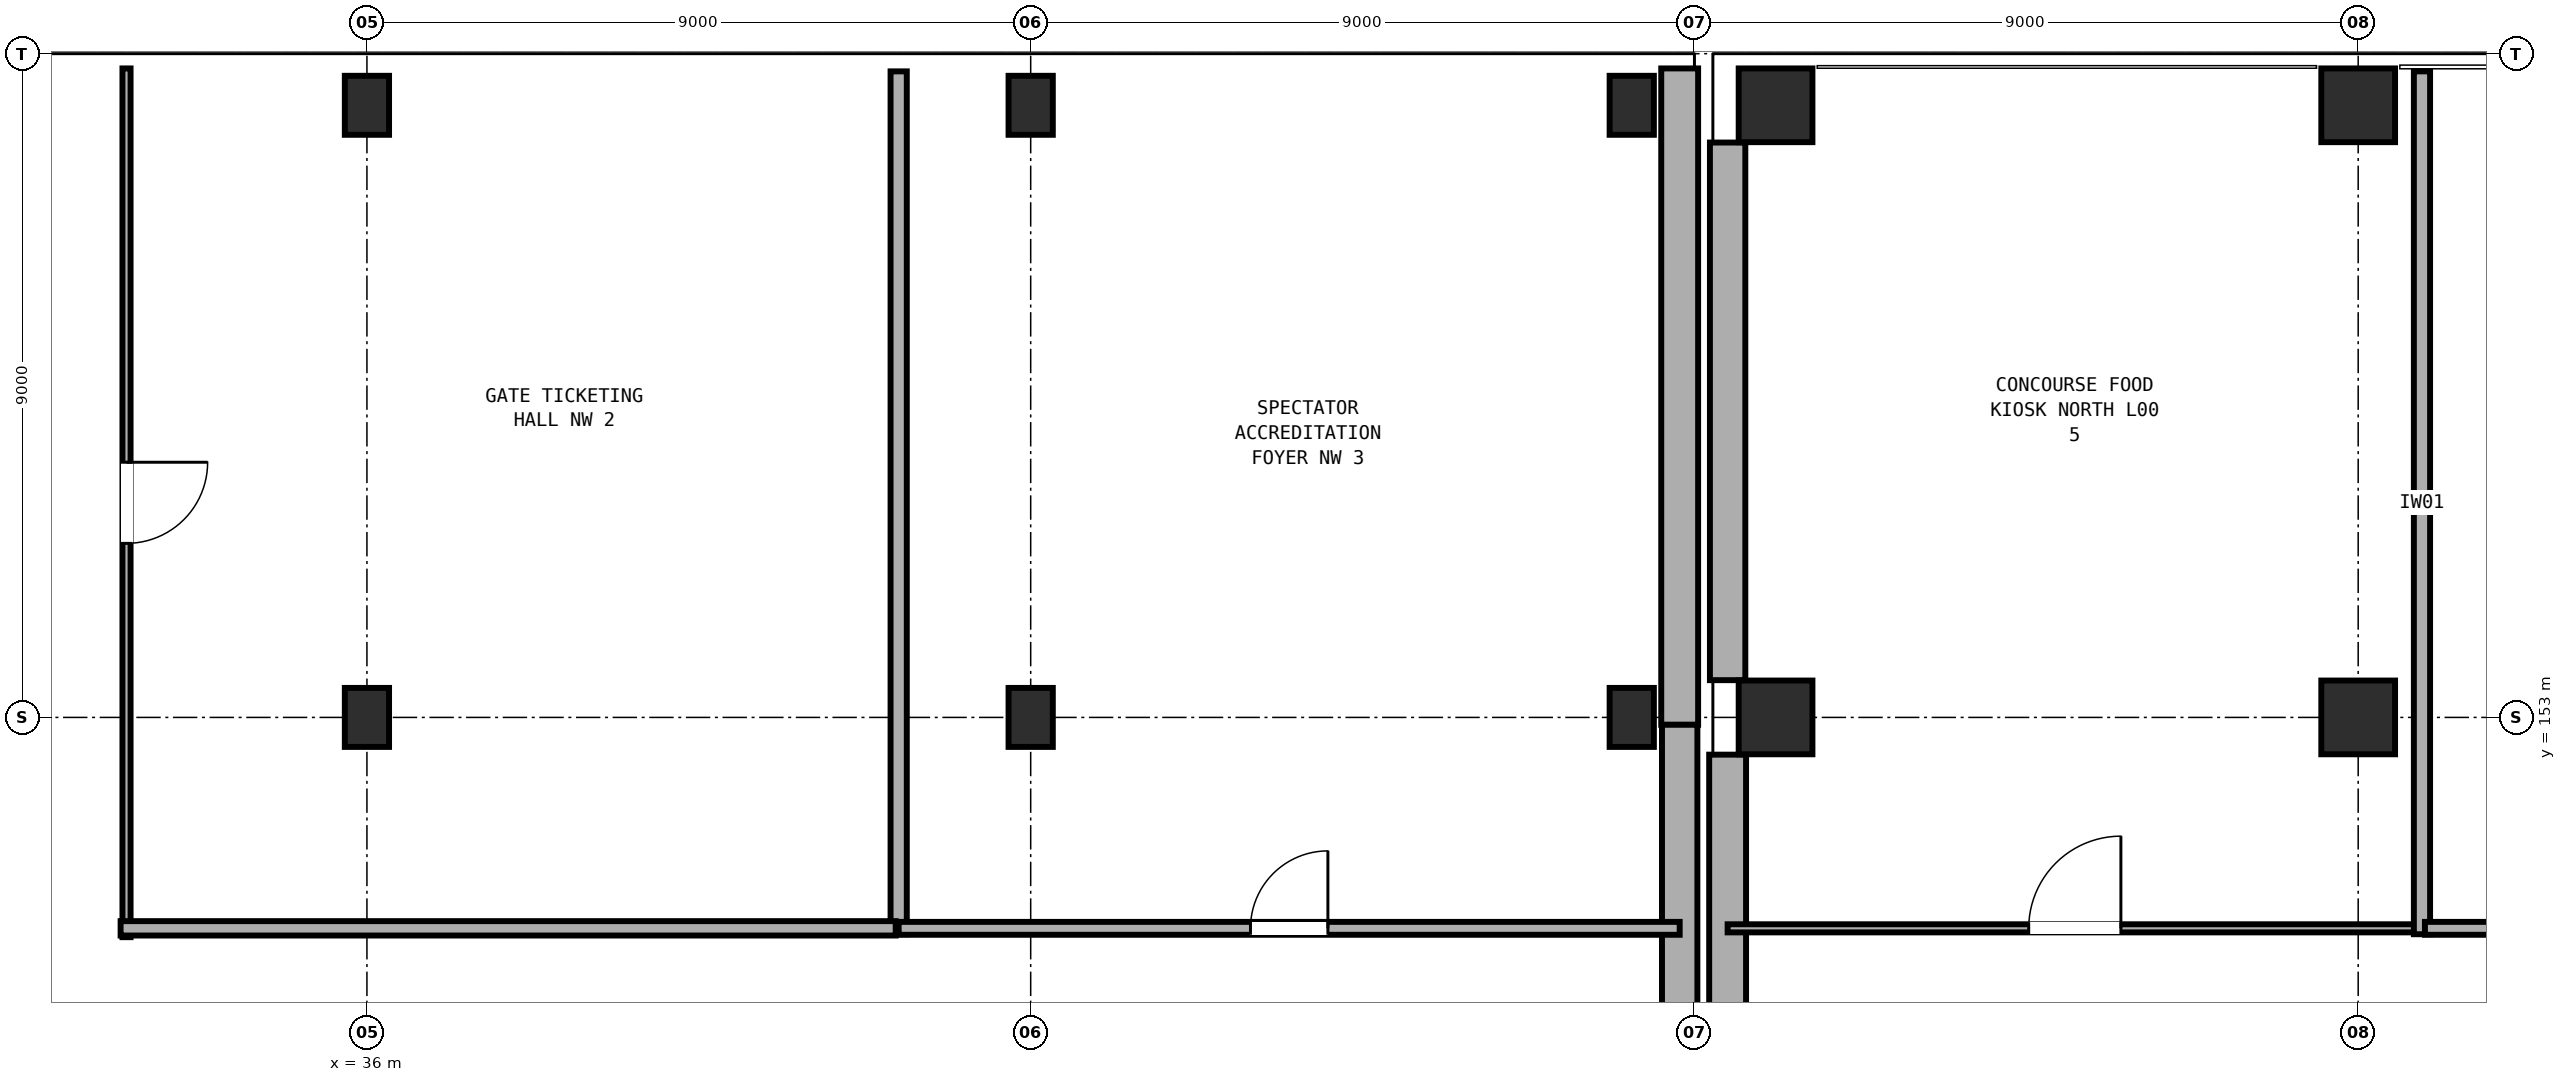
"""IFC4 building model, lengths in metres.
Left out: names, types, materials, properties, quantities, classifications, styles, units other than length and angle.
Written with IfcOpenShell. Run it as: python <this file> out.ifc"""

import sys

from ifc_helpers import new_model, si_unit, direction, frame, frame_2d, origin, origin_2d, place, context, subcontext, project, spatial, rectangle, extrude, element, fill, save


model = new_model("IFC4")
c1 = context("Model", 3, precision=1e-05, world=origin(), true_north=direction((0.0, 1.0)))
c2 = subcontext(c1, "Body", "Model", "MODEL_VIEW")
j1 = project(units=[si_unit("LENGTHUNIT", "METRE"), si_unit("PLANEANGLEUNIT", "RADIAN")], contexts=[c1])
p1 = place(None, origin())
s1 = spatial("IfcSite", under=j1, at=p1, CompositionType="ELEMENT")
p2 = place(p1, origin())
s2 = spatial("IfcBuilding", under=s1, at=p2, CompositionType="ELEMENT")
p3 = place(p2, origin())
s3 = spatial("IfcBuildingStorey", under=s2, at=p3, CompositionType="ELEMENT", Elevation=0.0)
for number, where, z_axis, x_axis in (
    (1, (55.1, 153.0, 0.0), (0.0, 0.0, 1.0), (1.0, 0.0, 0.0)),
    (2, (55.1, 161.3, 0.0), (0.0, 0.0, 1.0), (1.0, 0.0, 0.0)),
    (3, (63.0, 153.0, 0.0), (0.0, 0.0, 1.0), (1.0, 0.0, 0.0)),
    (4, (63.0, 161.3, 0.0), (0.0, 0.0, 1.0), (1.0, 0.0, 0.0)),
):
    element("IfcColumn", number, at=place(p3, frame(where, z_axis=z_axis, x_axis=x_axis)), inside=s3, PredefinedType="COLUMN", context=c2, shape_type="SweptSolid", body=[
        extrude(rectangle(XDim=1.0, YDim=1.0, at=origin_2d()), origin(), (0.0, 0.0, 1.0), 4.8),
    ])
for number, where, z_axis, x_axis in (
    (5, (36.0, 153.0, 0.0), (0.0, 0.0, 1.0), (1.0, 0.0, 0.0)),
    (6, (36.0, 161.3, 0.0), (0.0, 0.0, 1.0), (1.0, 0.0, 0.0)),
    (7, (45.0, 153.0, 0.0), (0.0, 0.0, 1.0), (1.0, 0.0, 0.0)),
    (8, (45.0, 161.3, 0.0), (0.0, 0.0, 1.0), (1.0, 0.0, 0.0)),
    (9, (53.15, 153.0, 0.0), (0.0, 0.0, 1.0), (1.0, 0.0, 0.0)),
    (10, (53.15, 161.3, 0.0), (0.0, 0.0, 1.0), (1.0, 0.0, 0.0)),
):
    element("IfcColumn", number, at=place(p3, frame(where, z_axis=z_axis, x_axis=x_axis)), inside=s3, PredefinedType="COLUMN", context=c2, shape_type="SweptSolid", body=[
        extrude(rectangle(XDim=0.6, YDim=0.8, at=origin_2d()), origin(), (0.0, 0.0, 1.0), 4.8),
    ])
p4 = place(p3, frame((54.45, 144.505, 0.0), z_axis=(0.0, 0.0, 1.0), x_axis=(0.0, 1.0, 0.0)))
e11 = element("IfcWall", 11, at=p4, inside=s3, PredefinedType="SOLIDWALL", context=c2, shape_type="SweptSolid", body=[
    extrude(rectangle(XDim=7.99, YDim=0.5, at=frame_2d((3.995, 0.0))), origin(), (0.0, 0.0, 1.0), 3.28),
])
p5 = place(p3, frame((54.45, 153.505, 0.0), z_axis=(0.0, 0.0, 1.0), x_axis=(0.0, 1.0, 0.0)))
e12 = element("IfcWall", 12, at=p5, inside=s3, PredefinedType="SOLIDWALL", context=c2, shape_type="SweptSolid", body=[
    extrude(rectangle(XDim=7.29, YDim=0.48, at=frame_2d((3.645, 0.0))), origin(), (0.0, 0.0, 1.0), 3.28),
])
p6 = place(p3, frame((55.605, 161.8, 0.0), z_axis=(0.0, 0.0, 1.0), x_axis=(1.0, 0.0, 0.0)))
e13 = element("IfcWall", 13, at=p6, inside=s3, PredefinedType="SOLIDWALL", context=c2, shape_type="SweptSolid", body=[
    extrude(rectangle(XDim=6.89, YDim=0.31, at=frame_2d((3.445, 0.0))), origin(), (0.0, 0.0, 1.0), 3.58),
])
p7 = place(p6, frame((1.695, 0.0, 0.0)))
e14 = element("IfcOpeningElement", 14, at=p7, cuts=e13, PredefinedType="OPENING", context=c2, shape_type="SweptSolid", body=[
    extrude(rectangle(XDim=3.5, YDim=2.6, at=frame_2d((1.75, 1.3))), frame((0.0, 0.165, 0.0), z_axis=(0.0, -1.0, 0.0), x_axis=(1.0, 0.0, 0.0)), (0.0, 0.0, 1.0), 0.33),
])
p8 = place(p3, frame((63.505, 161.8, 0.0), z_axis=(0.0, 0.0, 1.0), x_axis=(1.0, 0.0, 0.0)))
e15 = element("IfcWall", 15, at=p8, inside=s3, PredefinedType="SOLIDWALL", context=c2, shape_type="SweptSolid", body=[
    extrude(rectangle(XDim=7.99, YDim=0.29, at=frame_2d((3.995, 0.0))), origin(), (0.0, 0.0, 1.0), 3.58),
])
p9 = place(p8, frame((2.295, 0.0, 0.0)))
e16 = element("IfcOpeningElement", 16, at=p9, cuts=e15, PredefinedType="OPENING", context=c2, shape_type="SweptSolid", body=[
    extrude(rectangle(XDim=3.4, YDim=2.55, at=frame_2d((1.7, 1.275))), frame((0.0, 0.155, 0.0), z_axis=(0.0, -1.0, 0.0), x_axis=(1.0, 0.0, 0.0)), (0.0, 0.0, 1.0), 0.31),
])
p10 = place(p3, frame((27.305, 161.8, 0.0), z_axis=(0.0, 0.0, 1.0), x_axis=(1.0, 0.0, 0.0)))
e17 = element("IfcWall", 17, at=p10, inside=s3, PredefinedType="SOLIDWALL", context=c2, shape_type="SweptSolid", body=[
    extrude(rectangle(XDim=8.39, YDim=0.48, at=frame_2d((4.195, 0.0))), origin(), (0.0, 0.0, 1.0), 3.58),
])
p11 = place(p10, frame((1.395, 0.0, 0.0)))
e18 = element("IfcOpeningElement", 18, at=p11, cuts=e17, PredefinedType="OPENING", context=c2, shape_type="SweptSolid", body=[
    extrude(rectangle(XDim=3.6, YDim=2.6, at=frame_2d((1.8, 1.3))), frame((0.0, 0.25, 0.0), z_axis=(0.0, -1.0, 0.0), x_axis=(1.0, 0.0, 0.0)), (0.0, 0.0, 1.0), 0.5),
])
p12 = place(p3, frame((36.305, 161.8, 0.0), z_axis=(0.0, 0.0, 1.0), x_axis=(1.0, 0.0, 0.0)))
e19 = element("IfcWall", 19, at=p12, inside=s3, PredefinedType="SOLIDWALL", context=c2, shape_type="SweptSolid", body=[
    extrude(rectangle(XDim=8.39, YDim=0.31, at=frame_2d((4.195, 0.0))), origin(), (0.0, 0.0, 1.0), 3.28),
])
p13 = place(p3, frame((45.305, 161.8, 0.0), z_axis=(0.0, 0.0, 1.0), x_axis=(1.0, 0.0, 0.0)))
e20 = element("IfcWall", 20, at=p13, inside=s3, PredefinedType="SOLIDWALL", context=c2, shape_type="SweptSolid", body=[
    extrude(rectangle(XDim=7.54, YDim=0.29, at=frame_2d((3.77, 0.0))), origin(), (0.0, 0.0, 1.0), 3.28),
])
p14 = place(p13, frame((2.695, 0.0, 0.0)))
e21 = element("IfcOpeningElement", 21, at=p14, cuts=e20, PredefinedType="OPENING", context=c2, shape_type="SweptSolid", body=[
    extrude(rectangle(XDim=2.15, YDim=2.1, at=frame_2d((1.075, 1.05))), frame((0.0, 0.155, 0.0), z_axis=(0.0, -1.0, 0.0), x_axis=(1.0, 0.0, 0.0)), (0.0, 0.0, 1.0), 0.31),
])
p15 = place(p3, frame((53.8, 161.8, 0.0), z_axis=(0.0, 0.0, 1.0), x_axis=(0.0, -1.0, 0.0)))
e22 = element("IfcWall", 22, at=p15, inside=s3, PredefinedType="SOLIDWALL", context=c2, shape_type="SweptSolid", body=[
    extrude(rectangle(XDim=8.9, YDim=0.5, at=frame_2d((4.45, 0.0))), origin(), (0.0, 0.0, 1.0), 3.28),
])
p16 = place(p3, frame((53.8, 152.9, 0.0), z_axis=(0.0, 0.0, 1.0), x_axis=(0.0, -1.0, 0.0)))
e23 = element("IfcWall", 23, at=p16, inside=s3, PredefinedType="SOLIDWALL", context=c2, shape_type="SweptSolid", body=[
    extrude(rectangle(XDim=8.9, YDim=0.48, at=frame_2d((4.45, 0.0))), origin(), (0.0, 0.0, 1.0), 3.28),
])
p17 = place(p3, frame((54.45, 150.14, 0.0), z_axis=(0.0, 0.0, 1.0), x_axis=(1.0, 0.0, 0.0)))
e24 = element("IfcWall", 24, at=p17, inside=s3, PredefinedType="PARTITIONING", context=c2, shape_type="SweptSolid", body=[
    extrude(rectangle(XDim=9.415, YDim=0.11, at=frame_2d((4.708, 0.0))), origin(), (0.0, 0.0, 1.0), 3.28),
])
p18 = place(p17, frame((4.083, 0.0, 0.0)))
e25 = element("IfcOpeningElement", 25, at=p18, cuts=e24, PredefinedType="OPENING", context=c2, shape_type="SweptSolid", body=[
    extrude(rectangle(XDim=1.25, YDim=2.15, at=frame_2d((0.625, 1.075))), frame((0.0, 0.065, 0.0), z_axis=(0.0, -1.0, 0.0), x_axis=(1.0, 0.0, 0.0)), (0.0, 0.0, 1.0), 0.13),
])
p19 = place(p3, frame((63.865, 161.76, 0.0), z_axis=(0.0, 0.0, 1.0), x_axis=(0.0, -1.0, 0.0)))
e26 = element("IfcWall", 26, at=p19, inside=s3, PredefinedType="PARTITIONING", context=c2, shape_type="SweptSolid", body=[
    extrude(rectangle(XDim=11.7, YDim=0.22, at=frame_2d((5.85, 0.0))), origin(), (0.0, 0.0, 1.0), 3.28),
])
p20 = place(p3, frame((73.24, 150.14, 0.0), z_axis=(0.0, 0.0, 1.0), x_axis=(-1.0, 0.0, 0.0)))
e27 = element("IfcWall", 27, at=p20, inside=s3, PredefinedType="PARTITIONING", context=c2, shape_type="SweptSolid", body=[
    extrude(rectangle(XDim=9.335, YDim=0.175, at=frame_2d((4.667, 0.0))), origin(), (0.0, 0.0, 1.0), 3.28),
])
p21 = place(p3, frame((32.74, 161.8, 0.0), z_axis=(0.0, 0.0, 1.0), x_axis=(0.0, -1.0, 0.0)))
e28 = element("IfcWall", 28, at=p21, inside=s3, PredefinedType="PARTITIONING", context=c2, shape_type="SweptSolid", body=[
    extrude(rectangle(XDim=11.78, YDim=0.11, at=frame_2d((5.89, 0.0))), origin(), (0.0, 0.0, 1.0), 3.28),
])
p22 = place(p21, frame((5.34, 0.0, 0.0)))
e29 = element("IfcOpeningElement", 29, at=p22, cuts=e28, PredefinedType="OPENING", context=c2, shape_type="SweptSolid", body=[
    extrude(rectangle(XDim=1.1, YDim=2.1, at=frame_2d((0.55, 1.05))), frame((0.0, 0.065, 0.0), z_axis=(0.0, -1.0, 0.0), x_axis=(1.0, 0.0, 0.0)), (0.0, 0.0, 1.0), 0.13),
])
p23 = place(p3, frame((43.21, 161.76, 0.0), z_axis=(0.0, 0.0, 1.0), x_axis=(0.0, -1.0, 0.0)))
e30 = element("IfcWall", 30, at=p23, inside=s3, PredefinedType="PARTITIONING", context=c2, shape_type="SweptSolid", body=[
    extrude(rectangle(XDim=11.7, YDim=0.22, at=frame_2d((5.85, 0.0))), origin(), (0.0, 0.0, 1.0), 3.28),
])
p24 = place(p3, frame((43.17, 150.14, 0.0), z_axis=(0.0, 0.0, 1.0), x_axis=(-1.0, 0.0, 0.0)))
e31 = element("IfcWall", 31, at=p24, inside=s3, PredefinedType="PARTITIONING", context=c2, shape_type="SweptSolid", body=[
    extrude(rectangle(XDim=10.51, YDim=0.195, at=frame_2d((5.255, 0.0))), origin(), (0.0, 0.0, 1.0), 3.28),
])
p25 = place(p3, frame((43.21, 150.14, 0.0), z_axis=(0.0, 0.0, 1.0), x_axis=(1.0, 0.0, 0.0)))
e32 = element("IfcWall", 32, at=p25, inside=s3, PredefinedType="PARTITIONING", context=c2, shape_type="SweptSolid", body=[
    extrude(rectangle(XDim=10.59, YDim=0.175, at=frame_2d((5.295, 0.0))), origin(), (0.0, 0.0, 1.0), 3.28),
])
p26 = place(p25, frame((4.77, 0.0, 0.0)))
e33 = element("IfcOpeningElement", 33, at=p26, cuts=e32, PredefinedType="OPENING", context=c2, shape_type="SweptSolid", body=[
    extrude(rectangle(XDim=1.05, YDim=2.1, at=frame_2d((0.525, 1.05))), frame((0.0, 0.097, 0.0), z_axis=(0.0, -1.0, 0.0), x_axis=(1.0, 0.0, 0.0)), (0.0, 0.0, 1.0), 0.195),
])
p27 = place(p11, origin())
e34 = element("IfcDoor", 34, at=p27, inside=s3, OperationType="DOUBLE_DOOR_SINGLE_SWING", PredefinedType="DOOR", context=c2, shape_type="SweptSolid", body=[
    extrude(rectangle(XDim=3.6, YDim=2.6, at=frame_2d((1.8, 1.3))), frame((0.0, 0.025, 0.0), z_axis=(0.0, -1.0, 0.0), x_axis=(1.0, 0.0, 0.0)), (0.0, 0.0, 1.0), 0.05),
])
fill(e18, e34)
p28 = place(p7, origin())
e35 = element("IfcDoor", 35, at=p28, inside=s3, OperationType="DOUBLE_DOOR_SINGLE_SWING", PredefinedType="DOOR", context=c2, shape_type="SweptSolid", body=[
    extrude(rectangle(XDim=3.5, YDim=2.6, at=frame_2d((1.75, 1.3))), frame((0.0, 0.025, 0.0), z_axis=(0.0, -1.0, 0.0), x_axis=(1.0, 0.0, 0.0)), (0.0, 0.0, 1.0), 0.05),
])
fill(e14, e35)
p29 = place(p14, origin())
e36 = element("IfcDoor", 36, at=p29, inside=s3, OperationType="DOUBLE_DOOR_SINGLE_SWING", PredefinedType="GATE", context=c2, shape_type="SweptSolid", body=[
    extrude(rectangle(XDim=2.15, YDim=2.1, at=frame_2d((1.075, 1.05))), frame((0.0, 0.025, 0.0), z_axis=(0.0, -1.0, 0.0), x_axis=(1.0, 0.0, 0.0)), (0.0, 0.0, 1.0), 0.05),
])
fill(e21, e36)
p30 = place(p18, origin())
e37 = element("IfcDoor", 37, at=p30, inside=s3, OperationType="SINGLE_SWING_RIGHT", PredefinedType="DOOR", context=c2, shape_type="SweptSolid", body=[
    extrude(rectangle(XDim=1.25, YDim=2.15, at=frame_2d((0.625, 1.075))), frame((0.0, 0.025, 0.0), z_axis=(0.0, -1.0, 0.0), x_axis=(1.0, 0.0, 0.0)), (0.0, 0.0, 1.0), 0.05),
])
fill(e25, e37)
p31 = place(p22, origin())
e38 = element("IfcDoor", 38, at=p31, inside=s3, OperationType="SINGLE_SWING_LEFT", PredefinedType="DOOR", context=c2, shape_type="SweptSolid", body=[
    extrude(rectangle(XDim=1.1, YDim=2.1, at=frame_2d((0.55, 1.05))), frame((0.0, 0.025, 0.0), z_axis=(0.0, -1.0, 0.0), x_axis=(1.0, 0.0, 0.0)), (0.0, 0.0, 1.0), 0.05),
])
fill(e29, e38)
p32 = place(p26, origin())
e39 = element("IfcDoor", 39, at=p32, inside=s3, OperationType="SINGLE_SWING_RIGHT", PredefinedType="DOOR", context=c2, shape_type="SweptSolid", body=[
    extrude(rectangle(XDim=1.05, YDim=2.1, at=frame_2d((0.525, 1.05))), frame((0.0, 0.025, 0.0), z_axis=(0.0, -1.0, 0.0), x_axis=(1.0, 0.0, 0.0)), (0.0, 0.0, 1.0), 0.05),
])
fill(e33, e39)
save(model, sys.argv[1])
